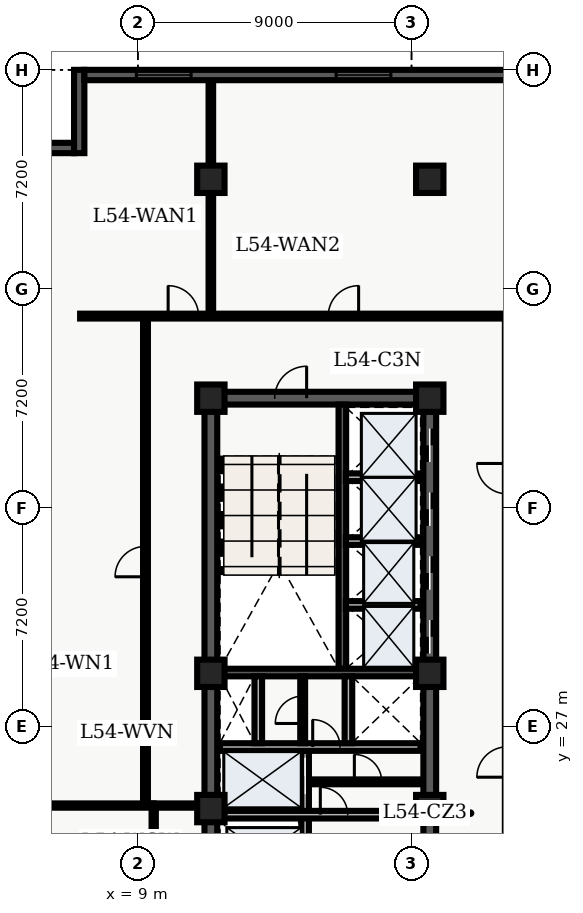
"""IFC4 building model, lengths in metres.
Left out: names, types, materials, properties, quantities, classifications, styles, units other than length and angle.
Written with IfcOpenShell. Run it as: python <this file> out.ifc"""

import sys

from ifc_helpers import new_model, entity, si_unit, converted_unit, direction, frame, origin_with_axes, origin_2d_with_axis, place, context, subcontext, project, spatial, polyline, rectangle, outline, extrude, element, fill, save


model = new_model("IFC4")
c1 = context("Model", 3, precision=1e-05, world=origin_with_axes(), true_north=direction((0.0, 1.0)))
c2 = subcontext(c1, "Body", "Model", "MODEL_VIEW")
j1 = project(units=[si_unit("LENGTHUNIT", "METRE"), converted_unit("PLANEANGLEUNIT", "DEGREE", entity("IfcPlaneAngleMeasure", 0.017), si_unit("PLANEANGLEUNIT", "RADIAN"), dimensions=[0, 0, 0, 0, 0, 0, 0])], contexts=[c1])
p1 = place(None, origin_with_axes())
s1 = spatial("IfcSite", under=j1, at=p1, CompositionType="ELEMENT")
p2 = place(p1, origin_with_axes())
s2 = spatial("IfcBuilding", under=s1, at=p2, CompositionType="ELEMENT")
p3 = place(p2, frame((0.0, 0.0, 219.9), z_axis=(0.0, 0.0, 1.0), x_axis=(1.0, 0.0, 0.0)))
s3 = spatial("IfcBuildingStorey", under=s2, at=p3, CompositionType="ELEMENT", Elevation=219.9)
p4 = place(p3, frame((11.4, 10.8, 0.0), z_axis=(0.0, 0.0, 1.0), x_axis=(0.0, 1.0, 0.0)))
e1 = element("IfcWall", 1, at=p4, inside=s3, PredefinedType="SHEAR", context=c2, shape_type="SweptSolid", body=[
    extrude(outline(polyline([(0.0, -0.21), (27.0, -0.21), (27.0, 0.21), (0.0, 0.21), (0.0, -0.21)])), origin_with_axes(), (0.0, 0.0, 1.0), 4.56),
])
p5 = place(p3, frame((11.4, 37.8, 0.0), z_axis=(0.0, 0.0, 1.0), x_axis=(1.0, 0.0, 0.0)))
e2 = element("IfcWall", 2, at=p5, inside=s3, PredefinedType="SHEAR", context=c2, shape_type="SweptSolid", body=[
    extrude(outline(polyline([(0.0, -0.21), (7.2, -0.21), (7.2, 0.21), (0.0, 0.21), (0.0, -0.21)])), origin_with_axes(), (0.0, 0.0, 1.0), 4.56),
])
p6 = place(p5, frame((2.625, 0.0, 0.0), z_axis=(0.0, 0.0, 1.0), x_axis=(1.0, 0.0, 0.0)))
e3 = element("IfcOpeningElement", 3, at=p6, cuts=e2, PredefinedType="OPENING", context=c2, shape_type="SweptSolid", body=[
    extrude(rectangle(XDim=1.05, YDim=0.44, at=origin_2d_with_axis()), origin_with_axes(), (0.0, 0.0, 1.0), 2.15),
])
p7 = place(p3, frame((18.6, 10.8, 0.0), z_axis=(0.0, 0.0, 1.0), x_axis=(0.0, 1.0, 0.0)))
e4 = element("IfcWall", 4, at=p7, inside=s3, PredefinedType="SHEAR", context=c2, shape_type="SweptSolid", body=[
    extrude(outline(polyline([(0.0, -0.21), (13.5, -0.21), (13.5, 0.21), (0.0, 0.21), (0.0, -0.21)])), origin_with_axes(), (0.0, 0.0, 1.0), 4.56),
])
p8 = place(p7, frame((1.3, 0.0, 0.0), z_axis=(0.0, 0.0, 1.0), x_axis=(1.0, 0.0, 0.0)))
e5 = element("IfcOpeningElement", 5, at=p8, cuts=e4, PredefinedType="OPENING", context=c2, shape_type="SweptSolid", body=[
    extrude(rectangle(XDim=1.1, YDim=0.44, at=origin_2d_with_axis()), origin_with_axes(), (0.0, 0.0, 1.0), 2.15),
])
p9 = place(p7, frame((3.4, 0.0, 0.0), z_axis=(0.0, 0.0, 1.0), x_axis=(1.0, 0.0, 0.0)))
e6 = element("IfcOpeningElement", 6, at=p9, cuts=e4, PredefinedType="OPENING", context=c2, shape_type="SweptSolid", body=[
    extrude(rectangle(XDim=1.1, YDim=0.44, at=origin_2d_with_axis()), origin_with_axes(), (0.0, 0.0, 1.0), 2.15),
])
p10 = place(p7, frame((11.125, 0.0, 0.0), z_axis=(0.0, 0.0, 1.0), x_axis=(1.0, 0.0, 0.0)))
e7 = element("IfcOpeningElement", 7, at=p10, cuts=e4, PredefinedType="OPENING", context=c2, shape_type="SweptSolid", body=[
    extrude(rectangle(XDim=1.05, YDim=0.44, at=origin_2d_with_axis()), origin_with_axes(), (0.0, 0.0, 1.0), 2.15),
])
p11 = place(p7, frame((6.675, 0.0, 0.0), z_axis=(0.0, 0.0, 1.0), x_axis=(1.0, 0.0, 0.0)))
e8 = element("IfcOpeningElement", 8, at=p11, cuts=e4, PredefinedType="OPENING", context=c2, shape_type="SweptSolid", body=[
    extrude(rectangle(XDim=0.95, YDim=0.44, at=origin_2d_with_axis()), origin_with_axes(), (0.0, 0.0, 1.0), 2.15),
])
p12 = place(p3, frame((18.6, 24.3, 0.0), z_axis=(0.0, 0.0, 1.0), x_axis=(0.0, 1.0, 0.0)))
e9 = element("IfcWall", 9, at=p12, inside=s3, PredefinedType="SHEAR", context=c2, shape_type="SweptSolid", body=[
    extrude(outline(polyline([(0.0, -0.21), (13.5, -0.21), (13.5, 0.21), (0.0, 0.21), (0.0, -0.21)])), origin_with_axes(), (0.0, 0.0, 1.0), 4.56),
])
p13 = place(p12, frame((5.65, 0.0, 0.0), z_axis=(0.0, 0.0, 1.0), x_axis=(1.0, 0.0, 0.0)))
e10 = element("IfcOpeningElement", 10, at=p13, cuts=e9, PredefinedType="OPENING", context=c2, shape_type="SweptSolid", body=[
    extrude(rectangle(XDim=1.1, YDim=0.44, at=origin_2d_with_axis()), origin_with_axes(), (0.0, 0.0, 1.0), 2.15),
])
p14 = place(p12, frame((7.75, 0.0, 0.0), z_axis=(0.0, 0.0, 1.0), x_axis=(1.0, 0.0, 0.0)))
e11 = element("IfcOpeningElement", 11, at=p14, cuts=e9, PredefinedType="OPENING", context=c2, shape_type="SweptSolid", body=[
    extrude(rectangle(XDim=1.1, YDim=0.44, at=origin_2d_with_axis()), origin_with_axes(), (0.0, 0.0, 1.0), 2.15),
])
p15 = place(p12, frame((9.85, 0.0, 0.0), z_axis=(0.0, 0.0, 1.0), x_axis=(1.0, 0.0, 0.0)))
e12 = element("IfcOpeningElement", 12, at=p15, cuts=e9, PredefinedType="OPENING", context=c2, shape_type="SweptSolid", body=[
    extrude(rectangle(XDim=1.1, YDim=0.44, at=origin_2d_with_axis()), origin_with_axes(), (0.0, 0.0, 1.0), 2.15),
])
p16 = place(p12, frame((11.95, 0.0, 0.0), z_axis=(0.0, 0.0, 1.0), x_axis=(1.0, 0.0, 0.0)))
e13 = element("IfcOpeningElement", 13, at=p16, cuts=e9, PredefinedType="OPENING", context=c2, shape_type="SweptSolid", body=[
    extrude(rectangle(XDim=1.1, YDim=0.44, at=origin_2d_with_axis()), origin_with_axes(), (0.0, 0.0, 1.0), 2.15),
])
p17 = place(p3, frame((15.725, 28.9, 0.0), z_axis=(0.0, 0.0, 1.0), x_axis=(0.0, 1.0, 0.0)))
e14 = element("IfcWall", 14, at=p17, inside=s3, PredefinedType="SHEAR", context=c2, shape_type="SweptSolid", body=[
    extrude(outline(polyline([(0.0, -0.125), (8.69, -0.125), (8.69, 0.125), (0.0, 0.125), (0.0, -0.125)])), origin_with_axes(), (0.0, 0.0, 1.0), 4.56),
])
p18 = place(p3, frame((11.61, 28.775, 0.0), z_axis=(0.0, 0.0, 1.0), x_axis=(1.0, 0.0, 0.0)))
e15 = element("IfcWall", 15, at=p18, inside=s3, PredefinedType="SHEAR", context=c2, shape_type="SweptSolid", body=[
    extrude(outline(polyline([(0.0, -0.125), (6.78, -0.125), (6.78, 0.125), (0.0, 0.125), (0.0, -0.125)])), origin_with_axes(), (0.0, 0.0, 1.0), 4.56),
])
p19 = place(p3, frame((14.5, 19.95, 0.0), z_axis=(0.0, 0.0, 1.0), x_axis=(0.0, 1.0, 0.0)))
e16 = element("IfcWall", 16, at=p19, inside=s3, PredefinedType="SOLIDWALL", context=c2, shape_type="SweptSolid", body=[
    extrude(outline(polyline([(0.0, -0.125), (6.25, -0.125), (6.25, 0.125), (0.0, 0.125), (0.0, -0.125)])), origin_with_axes(), (0.0, 0.0, 1.0), 3.6),
])
p20 = place(p19, frame((1.025, 0.0, 0.0), z_axis=(0.0, 0.0, 1.0), x_axis=(1.0, 0.0, 0.0)))
e17 = element("IfcOpeningElement", 17, at=p20, cuts=e16, PredefinedType="OPENING", context=c2, shape_type="SweptSolid", body=[
    extrude(rectangle(XDim=1.1, YDim=0.27, at=origin_2d_with_axis()), origin_with_axes(), (0.0, 0.0, 1.0), 2.15),
])
p21 = place(p19, frame((2.975, 0.0, 0.0), z_axis=(0.0, 0.0, 1.0), x_axis=(1.0, 0.0, 0.0)))
e18 = element("IfcOpeningElement", 18, at=p21, cuts=e16, PredefinedType="OPENING", context=c2, shape_type="SweptSolid", body=[
    extrude(rectangle(XDim=1.1, YDim=0.27, at=origin_2d_with_axis()), origin_with_axes(), (0.0, 0.0, 1.0), 2.15),
])
p22 = place(p19, frame((5.425, 0.0, 0.0), z_axis=(0.0, 0.0, 1.0), x_axis=(1.0, 0.0, 0.0)))
e19 = element("IfcOpeningElement", 19, at=p22, cuts=e16, PredefinedType="OPENING", context=c2, shape_type="SweptSolid", body=[
    extrude(rectangle(XDim=1.2, YDim=0.27, at=origin_2d_with_axis()), origin_with_axes(), (0.0, 0.0, 1.0), 2.15),
])
p23 = place(p3, frame((11.7, 24.1, 0.0), z_axis=(0.0, 0.0, 1.0), x_axis=(1.0, 0.0, 0.0)))
e20 = element("IfcWall", 20, at=p23, inside=s3, PredefinedType="SOLIDWALL", context=c2, shape_type="SweptSolid", body=[
    extrude(outline(polyline([(0.0, -0.125), (6.6, -0.125), (6.6, 0.125), (0.0, 0.125), (0.0, -0.125)])), origin_with_axes(), (0.0, 0.0, 1.0), 3.6),
])
p24 = place(p23, frame((3.75, 0.0, 0.0), z_axis=(0.0, 0.0, 1.0), x_axis=(1.0, 0.0, 0.0)))
e21 = element("IfcOpeningElement", 21, at=p24, cuts=e20, PredefinedType="OPENING", context=c2, shape_type="SweptSolid", body=[
    extrude(rectangle(XDim=0.9, YDim=0.27, at=origin_2d_with_axis()), origin_with_axes(), (0.0, 0.0, 1.0), 2.15),
])
p25 = place(p3, frame((11.7, 26.325, 0.0), z_axis=(0.0, 0.0, 1.0), x_axis=(1.0, 0.0, 0.0)))
e22 = element("IfcWall", 22, at=p25, inside=s3, PredefinedType="SOLIDWALL", context=c2, shape_type="SweptSolid", body=[
    extrude(outline(polyline([(0.0, -0.125), (6.6, -0.125), (6.6, 0.125), (0.0, 0.125), (0.0, -0.125)])), origin_with_axes(), (0.0, 0.0, 1.0), 3.6),
])
p26 = place(p25, frame((3.5, 0.0, 0.0), z_axis=(0.0, 0.0, 1.0), x_axis=(1.0, 0.0, 0.0)))
e23 = element("IfcOpeningElement", 23, at=p26, cuts=e22, PredefinedType="OPENING", context=c2, shape_type="SweptSolid", body=[
    extrude(rectangle(XDim=0.9, YDim=0.27, at=origin_2d_with_axis()), origin_with_axes(), (0.0, 0.0, 1.0), 2.15),
])
for number, where, z_axis, x_axis in (
    (24, (12.96, 26.45, 0.0), (0.0, 0.0, 1.0), (0.0, 1.0, 0.0)),
    (25, (15.925, 26.45, 0.0), (0.0, 0.0, 1.0), (0.0, 1.0, 0.0)),
):
    element("IfcWall", number, at=place(p3, frame(where, z_axis=z_axis, x_axis=x_axis)), inside=s3, PredefinedType="SOLIDWALL", context=c2, shape_type="SweptSolid", body=[
        extrude(outline(polyline([(0.0, -0.125), (2.2, -0.125), (2.2, 0.125), (0.0, 0.125), (0.0, -0.125)])), origin_with_axes(), (0.0, 0.0, 1.0), 3.6),
    ])
for number, where, z_axis, x_axis in (
    (26, (11.4, 24.3, 0.0), (0.0, 0.0, 1.0), (1.0, 0.0, 0.0)),
    (27, (11.4, 28.75, 0.0), (0.0, 0.0, 1.0), (1.0, 0.0, 0.0)),
    (28, (11.4, 37.8, 0.0), (0.0, 0.0, 1.0), (1.0, 0.0, 0.0)),
    (29, (11.4, 45.0, 0.0), (0.0, 0.0, 1.0), (1.0, 0.0, 0.0)),
    (30, (18.6, 24.3, 0.0), (0.0, 0.0, 1.0), (1.0, 0.0, 0.0)),
    (31, (18.6, 28.75, 0.0), (0.0, 0.0, 1.0), (1.0, 0.0, 0.0)),
    (32, (18.6, 37.8, 0.0), (0.0, 0.0, 1.0), (1.0, 0.0, 0.0)),
    (33, (18.6, 45.0, 0.0), (0.0, 0.0, 1.0), (1.0, 0.0, 0.0)),
):
    element("IfcColumn", number, at=place(p3, frame(where, z_axis=z_axis, x_axis=x_axis)), inside=s3, PredefinedType="COLUMN", context=c2, shape_type="SweptSolid", body=[
        extrude(rectangle(XDim=0.9, YDim=0.9, at=origin_2d_with_axis()), origin_with_axes(), (0.0, 0.0, 1.0), 4.8),
    ])
p27 = place(p3, frame((14.62, 25.18, 0.0), z_axis=(0.0, 0.0, 1.0), x_axis=(1.0, 0.0, 0.0)))
e34 = element("IfcWall", 34, at=p27, inside=s3, PredefinedType="PARTITIONING", context=c2, shape_type="SweptSolid", body=[
    extrude(outline(polyline([(0.0, -0.08), (3.68, -0.08), (3.68, 0.08), (0.0, 0.08), (0.0, -0.08)])), origin_with_axes(), (0.0, 0.0, 1.0), 3.2),
])
p28 = place(p27, frame((1.95, 0.0, 0.0), z_axis=(0.0, 0.0, 1.0), x_axis=(1.0, 0.0, 0.0)))
e35 = element("IfcOpeningElement", 35, at=p28, cuts=e34, PredefinedType="OPENING", context=c2, shape_type="SweptSolid", body=[
    extrude(rectangle(XDim=0.9, YDim=0.18, at=origin_2d_with_axis()), origin_with_axes(), (0.0, 0.0, 1.0), 2.15),
])
p29 = place(p3, frame((14.42, 26.45, 0.0), z_axis=(0.0, 0.0, 1.0), x_axis=(0.0, 1.0, 0.0)))
e36 = element("IfcWall", 36, at=p29, inside=s3, PredefinedType="PARTITIONING", context=c2, shape_type="SweptSolid", body=[
    extrude(outline(polyline([(0.0, -0.08), (2.2, -0.08), (2.2, 0.08), (0.0, 0.08), (0.0, -0.08)])), origin_with_axes(), (0.0, 0.0, 1.0), 3.2),
])
p30 = place(p29, frame((1.1, 0.0, 0.0), z_axis=(0.0, 0.0, 1.0), x_axis=(1.0, 0.0, 0.0)))
e37 = element("IfcOpeningElement", 37, at=p30, cuts=e36, PredefinedType="OPENING", context=c2, shape_type="SweptSolid", body=[
    extrude(rectangle(XDim=0.9, YDim=0.18, at=origin_2d_with_axis()), origin_with_axes(), (0.0, 0.0, 1.0), 2.15),
])
for number, where, z_axis, x_axis in (
    (38, (15.84, 31.0, 0.0), (0.0, 0.0, 1.0), (1.0, 0.0, 0.0)),
    (39, (15.84, 33.1, 0.0), (0.0, 0.0, 1.0), (1.0, 0.0, 0.0)),
    (40, (15.84, 35.2, 0.0), (0.0, 0.0, 1.0), (1.0, 0.0, 0.0)),
):
    element("IfcWall", number, at=place(p3, frame(where, z_axis=z_axis, x_axis=x_axis)), inside=s3, PredefinedType="SOLIDWALL", context=c2, shape_type="SweptSolid", body=[
        extrude(outline(polyline([(0.0, -0.125), (2.46, -0.125), (2.46, 0.125), (0.0, 0.125), (0.0, -0.125)])), origin_with_axes(), (0.0, 0.0, 1.0), 3.2),
    ])
p31 = place(p3, frame((9.52, 20.4, 0.0), z_axis=(0.0, 0.0, 1.0), x_axis=(0.0, 1.0, 0.0)))
e41 = element("IfcWall", 41, at=p31, inside=s3, PredefinedType="PARTITIONING", context=c2, shape_type="SweptSolid", body=[
    extrude(outline(polyline([(0.0, -0.07), (4.0, -0.07), (4.0, 0.07), (0.0, 0.07), (0.0, -0.07)])), origin_with_axes(), (0.0, 0.0, 1.0), 3.2),
])
p32 = place(p3, frame((9.52, 24.4, 0.0), z_axis=(0.0, 0.0, 1.0), x_axis=(1.0, 0.0, 0.0)))
e42 = element("IfcWall", 42, at=p32, inside=s3, PredefinedType="PARTITIONING", context=c2, shape_type="SweptSolid", body=[
    extrude(outline(polyline([(0.0, -0.07), (1.58, -0.07), (1.58, 0.07), (0.0, 0.07), (0.0, -0.07)])), origin_with_axes(), (0.0, 0.0, 1.0), 3.2),
])
p33 = place(p3, frame((7.1, 40.5, 0.0), z_axis=(0.0, 0.0, 1.0), x_axis=(1.0, 0.0, 0.0)))
e43 = element("IfcWall", 43, at=p33, inside=s3, PredefinedType="PARTITIONING", context=c2, shape_type="SweptSolid", body=[
    extrude(outline(polyline([(0.0, -0.08), (24.965, -0.08), (24.965, 0.08), (0.0, 0.08), (0.0, -0.08)])), origin_with_axes(), (0.0, 0.0, 1.0), 3.2),
])
p34 = place(p33, frame((3.395, 0.0, 0.0), z_axis=(0.0, 0.0, 1.0), x_axis=(1.0, 0.0, 0.0)))
e44 = element("IfcOpeningElement", 44, at=p34, cuts=e43, PredefinedType="OPENING", context=c2, shape_type="SweptSolid", body=[
    extrude(rectangle(XDim=1.0, YDim=0.18, at=origin_2d_with_axis()), origin_with_axes(), (0.0, 0.0, 1.0), 2.15),
])
p35 = place(p33, frame((8.66, 0.0, 0.0), z_axis=(0.0, 0.0, 1.0), x_axis=(1.0, 0.0, 0.0)))
e45 = element("IfcOpeningElement", 45, at=p35, cuts=e43, PredefinedType="OPENING", context=c2, shape_type="SweptSolid", body=[
    extrude(rectangle(XDim=1.0, YDim=0.18, at=origin_2d_with_axis()), origin_with_axes(), (0.0, 0.0, 1.0), 2.15),
])
p36 = place(p3, frame((9.25, 24.4, 0.0), z_axis=(0.0, 0.0, 1.0), x_axis=(0.0, 1.0, 0.0)))
e46 = element("IfcWall", 46, at=p36, inside=s3, PredefinedType="PARTITIONING", context=c2, shape_type="SweptSolid", body=[
    extrude(outline(polyline([(0.0, -0.08), (16.1, -0.08), (16.1, 0.08), (0.0, 0.08), (0.0, -0.08)])), origin_with_axes(), (0.0, 0.0, 1.0), 3.2),
])
p37 = place(p36, frame((8.025, 0.0, 0.0), z_axis=(0.0, 0.0, 1.0), x_axis=(1.0, 0.0, 0.0)))
e47 = element("IfcOpeningElement", 47, at=p37, cuts=e46, PredefinedType="OPENING", context=c2, shape_type="SweptSolid", body=[
    extrude(rectangle(XDim=1.0, YDim=0.18, at=origin_2d_with_axis()), origin_with_axes(), (0.0, 0.0, 1.0), 2.15),
])
p38 = place(p3, frame((4.835, 24.4, 0.0), z_axis=(0.0, 0.0, 1.0), x_axis=(1.0, 0.0, 0.0)))
e48 = element("IfcWall", 48, at=p38, inside=s3, PredefinedType="PARTITIONING", context=c2, shape_type="SweptSolid", body=[
    extrude(outline(polyline([(0.0, -0.07), (4.685, -0.07), (4.685, 0.07), (0.0, 0.07), (0.0, -0.07)])), origin_with_axes(), (0.0, 0.0, 1.0), 3.2),
])
p39 = place(p3, frame((11.4, 40.6, 0.0), z_axis=(0.0, 0.0, 1.0), x_axis=(0.0, 1.0, 0.0)))
e49 = element("IfcWall", 49, at=p39, inside=s3, PredefinedType="PARTITIONING", context=c2, shape_type="SweptSolid", body=[
    extrude(outline(polyline([(0.0, -0.075), (7.665, -0.075), (7.665, 0.075), (0.0, 0.075), (0.0, -0.075)])), origin_with_axes(), (0.0, 0.0, 1.0), 3.2),
])
p40 = place(p3, frame((4.84, 46.03, 0.0), z_axis=(0.0, 0.0, 1.0), x_axis=(1.0, 0.0, 0.0)))
e50 = element("IfcWall", 50, at=p40, inside=s3, PredefinedType="SOLIDWALL", context=c2, shape_type="SweptSolid", body=[
    extrude(outline(polyline([(0.0, -0.17), (2.06, -0.17), (2.06, 0.17), (0.0, 0.17), (0.0, -0.17)])), origin_with_axes(), (0.0, 0.0, 1.0), 4.56),
])
p41 = place(p3, frame((7.07, 45.86, 0.0), z_axis=(0.0, 0.0, 1.0), x_axis=(0.0, 1.0, 0.0)))
e51 = element("IfcWall", 51, at=p41, inside=s3, PredefinedType="SOLIDWALL", context=c2, shape_type="SweptSolid", body=[
    extrude(outline(polyline([(0.0, -0.17), (2.74, -0.17), (2.74, 0.17), (0.0, 0.17), (0.0, -0.17)])), origin_with_axes(), (0.0, 0.0, 1.0), 4.56),
])
p42 = place(p3, frame((7.24, 48.43, 0.0), z_axis=(0.0, 0.0, 1.0), x_axis=(1.0, 0.0, 0.0)))
e52 = element("IfcWall", 52, at=p42, inside=s3, PredefinedType="SOLIDWALL", context=c2, shape_type="SweptSolid", body=[
    extrude(outline(polyline([(0.0, -0.17), (18.36, -0.17), (18.36, 0.17), (0.0, 0.17), (0.0, -0.17)])), origin_with_axes(), (0.0, 0.0, 1.0), 4.56),
])
p43 = place(p42, frame((2.61, 0.0, 0.45), z_axis=(0.0, 0.0, 1.0), x_axis=(1.0, 0.0, 0.0)))
e53 = element("IfcOpeningElement", 53, at=p43, cuts=e52, PredefinedType="OPENING", context=c2, shape_type="SweptSolid", body=[
    extrude(rectangle(XDim=1.8, YDim=0.36, at=origin_2d_with_axis()), origin_with_axes(), (0.0, 0.0, 1.0), 2.1),
])
p44 = place(p42, frame((9.18, 0.0, 0.45), z_axis=(0.0, 0.0, 1.0), x_axis=(1.0, 0.0, 0.0)))
e54 = element("IfcOpeningElement", 54, at=p44, cuts=e52, PredefinedType="OPENING", context=c2, shape_type="SweptSolid", body=[
    extrude(rectangle(XDim=1.8, YDim=0.36, at=origin_2d_with_axis()), origin_with_axes(), (0.0, 0.0, 1.0), 2.1),
])
p45 = place(p42, frame((14.9, 0.0, 0.45), z_axis=(0.0, 0.0, 1.0), x_axis=(1.0, 0.0, 0.0)))
e55 = element("IfcOpeningElement", 55, at=p45, cuts=e52, PredefinedType="OPENING", context=c2, shape_type="SweptSolid", body=[
    extrude(rectangle(XDim=1.8, YDim=0.36, at=origin_2d_with_axis()), origin_with_axes(), (0.0, 0.0, 1.0), 2.1),
])
p46 = place(p12, frame((5.65, 0.0, 0.0), z_axis=(0.0, 0.0, 1.0), x_axis=(1.0, 0.0, 0.0)))
e56 = element("IfcDoor", 56, at=p46, inside=s3, OperationType="SLIDING_TO_LEFT", PredefinedType="DOOR", context=c2, shape_type="SweptSolid", body=[
    extrude(rectangle(XDim=1.1, YDim=0.09, at=origin_2d_with_axis()), origin_with_axes(), (0.0, 0.0, 1.0), 2.15),
])
fill(e10, e56)
p47 = place(p12, frame((7.75, 0.0, 0.0), z_axis=(0.0, 0.0, 1.0), x_axis=(1.0, 0.0, 0.0)))
e57 = element("IfcDoor", 57, at=p47, inside=s3, OperationType="SLIDING_TO_RIGHT", PredefinedType="DOOR", context=c2, shape_type="SweptSolid", body=[
    extrude(rectangle(XDim=1.1, YDim=0.09, at=origin_2d_with_axis()), origin_with_axes(), (0.0, 0.0, 1.0), 2.15),
])
fill(e11, e57)
p48 = place(p12, frame((9.85, 0.0, 0.0), z_axis=(0.0, 0.0, 1.0), x_axis=(1.0, 0.0, 0.0)))
e58 = element("IfcDoor", 58, at=p48, inside=s3, OperationType="DOUBLE_DOOR_SLIDING", PredefinedType="DOOR", context=c2, shape_type="SweptSolid", body=[
    extrude(rectangle(XDim=1.1, YDim=0.09, at=origin_2d_with_axis()), origin_with_axes(), (0.0, 0.0, 1.0), 2.15),
])
fill(e12, e58)
p49 = place(p12, frame((11.95, 0.0, 0.0), z_axis=(0.0, 0.0, 1.0), x_axis=(1.0, 0.0, 0.0)))
e59 = element("IfcDoor", 59, at=p49, inside=s3, OperationType="DOUBLE_DOOR_SLIDING", PredefinedType="DOOR", context=c2, shape_type="SweptSolid", body=[
    extrude(rectangle(XDim=1.1, YDim=0.09, at=origin_2d_with_axis()), origin_with_axes(), (0.0, 0.0, 1.0), 2.15),
])
fill(e13, e59)
p50 = place(p19, frame((5.425, 0.0, 0.0), z_axis=(0.0, 0.0, 1.0), x_axis=(1.0, 0.0, 0.0)))
e60 = element("IfcDoor", 60, at=p50, inside=s3, OperationType="DOUBLE_DOOR_SLIDING", PredefinedType="DOOR", context=c2, shape_type="SweptSolid", body=[
    extrude(rectangle(XDim=1.2, YDim=0.09, at=origin_2d_with_axis()), origin_with_axes(), (0.0, 0.0, 1.0), 2.15),
])
fill(e19, e60)
p51 = place(p5, frame((2.625, 0.0, 0.0), z_axis=(0.0, 0.0, 1.0), x_axis=(1.0, 0.0, 0.0)))
e61 = element("IfcDoor", 61, at=p51, inside=s3, OperationType="SINGLE_SWING_RIGHT", PredefinedType="DOOR", context=c2, shape_type="SweptSolid", body=[
    extrude(rectangle(XDim=1.05, YDim=0.09, at=origin_2d_with_axis()), origin_with_axes(), (0.0, 0.0, 1.0), 2.15),
])
fill(e3, e61)
p52 = place(p25, frame((3.5, 0.0, 0.0), z_axis=(0.0, 0.0, 1.0), x_axis=(1.0, 0.0, 0.0)))
e62 = element("IfcDoor", 62, at=p52, inside=s3, OperationType="SINGLE_SWING_LEFT", PredefinedType="DOOR", context=c2, shape_type="SweptSolid", body=[
    extrude(rectangle(XDim=0.9, YDim=0.09, at=origin_2d_with_axis()), origin_with_axes(), (0.0, 0.0, 1.0), 2.15),
])
fill(e23, e62)
p53 = place(p29, frame((1.1, 0.0, 0.0), z_axis=(0.0, 0.0, 1.0), x_axis=(1.0, 0.0, 0.0)))
e63 = element("IfcDoor", 63, at=p53, inside=s3, OperationType="SINGLE_SWING_LEFT", PredefinedType="DOOR", context=c2, shape_type="SweptSolid", body=[
    extrude(rectangle(XDim=0.9, YDim=0.09, at=origin_2d_with_axis()), origin_with_axes(), (0.0, 0.0, 1.0), 2.15),
])
fill(e37, e63)
p54 = place(p23, frame((3.75, 0.0, 0.0), z_axis=(0.0, 0.0, 1.0), x_axis=(1.0, 0.0, 0.0)))
e64 = element("IfcDoor", 64, at=p54, inside=s3, OperationType="SINGLE_SWING_LEFT", PredefinedType="DOOR", context=c2, shape_type="SweptSolid", body=[
    extrude(rectangle(XDim=0.9, YDim=0.09, at=origin_2d_with_axis()), origin_with_axes(), (0.0, 0.0, 1.0), 2.15),
])
fill(e21, e64)
p55 = place(p27, frame((1.95, 0.0, 0.0), z_axis=(0.0, 0.0, 1.0), x_axis=(1.0, 0.0, 0.0)))
e65 = element("IfcDoor", 65, at=p55, inside=s3, OperationType="SINGLE_SWING_LEFT", PredefinedType="DOOR", context=c2, shape_type="SweptSolid", body=[
    extrude(rectangle(XDim=0.9, YDim=0.09, at=origin_2d_with_axis()), origin_with_axes(), (0.0, 0.0, 1.0), 2.15),
])
fill(e35, e65)
p56 = place(p36, frame((8.025, 0.0, 0.0), z_axis=(0.0, 0.0, 1.0), x_axis=(1.0, 0.0, 0.0)))
e66 = element("IfcDoor", 66, at=p56, inside=s3, OperationType="SINGLE_SWING_LEFT", PredefinedType="DOOR", context=c2, shape_type="SweptSolid", body=[
    extrude(rectangle(XDim=1.0, YDim=0.09, at=origin_2d_with_axis()), origin_with_axes(), (0.0, 0.0, 1.0), 2.15),
])
fill(e47, e66)
p57 = place(p33, frame((3.395, 0.0, 0.0), z_axis=(0.0, 0.0, 1.0), x_axis=(1.0, 0.0, 0.0)))
e67 = element("IfcDoor", 67, at=p57, inside=s3, OperationType="SINGLE_SWING_LEFT", PredefinedType="DOOR", context=c2, shape_type="SweptSolid", body=[
    extrude(rectangle(XDim=1.0, YDim=0.09, at=origin_2d_with_axis()), origin_with_axes(), (0.0, 0.0, 1.0), 2.15),
])
fill(e44, e67)
p58 = place(p33, frame((8.66, 0.0, 0.0), z_axis=(0.0, 0.0, 1.0), x_axis=(1.0, 0.0, 0.0)))
e68 = element("IfcDoor", 68, at=p58, inside=s3, OperationType="SINGLE_SWING_RIGHT", PredefinedType="DOOR", context=c2, shape_type="SweptSolid", body=[
    extrude(rectangle(XDim=1.0, YDim=0.09, at=origin_2d_with_axis()), origin_with_axes(), (0.0, 0.0, 1.0), 2.15),
])
fill(e45, e68)
p59 = place(p42, frame((2.61, 0.0, 0.45), z_axis=(0.0, 0.0, 1.0), x_axis=(1.0, 0.0, 0.0)))
e69 = element("IfcWindow", 69, at=p59, inside=s3, PredefinedType="WINDOW", context=c2, shape_type="SweptSolid", body=[
    extrude(rectangle(XDim=1.8, YDim=0.09, at=origin_2d_with_axis()), origin_with_axes(), (0.0, 0.0, 1.0), 2.1),
])
fill(e53, e69)
p60 = place(p42, frame((9.18, 0.0, 0.45), z_axis=(0.0, 0.0, 1.0), x_axis=(1.0, 0.0, 0.0)))
e70 = element("IfcWindow", 70, at=p60, inside=s3, PredefinedType="WINDOW", context=c2, shape_type="SweptSolid", body=[
    extrude(rectangle(XDim=1.8, YDim=0.09, at=origin_2d_with_axis()), origin_with_axes(), (0.0, 0.0, 1.0), 2.1),
])
fill(e54, e70)
save(model, sys.argv[1])
